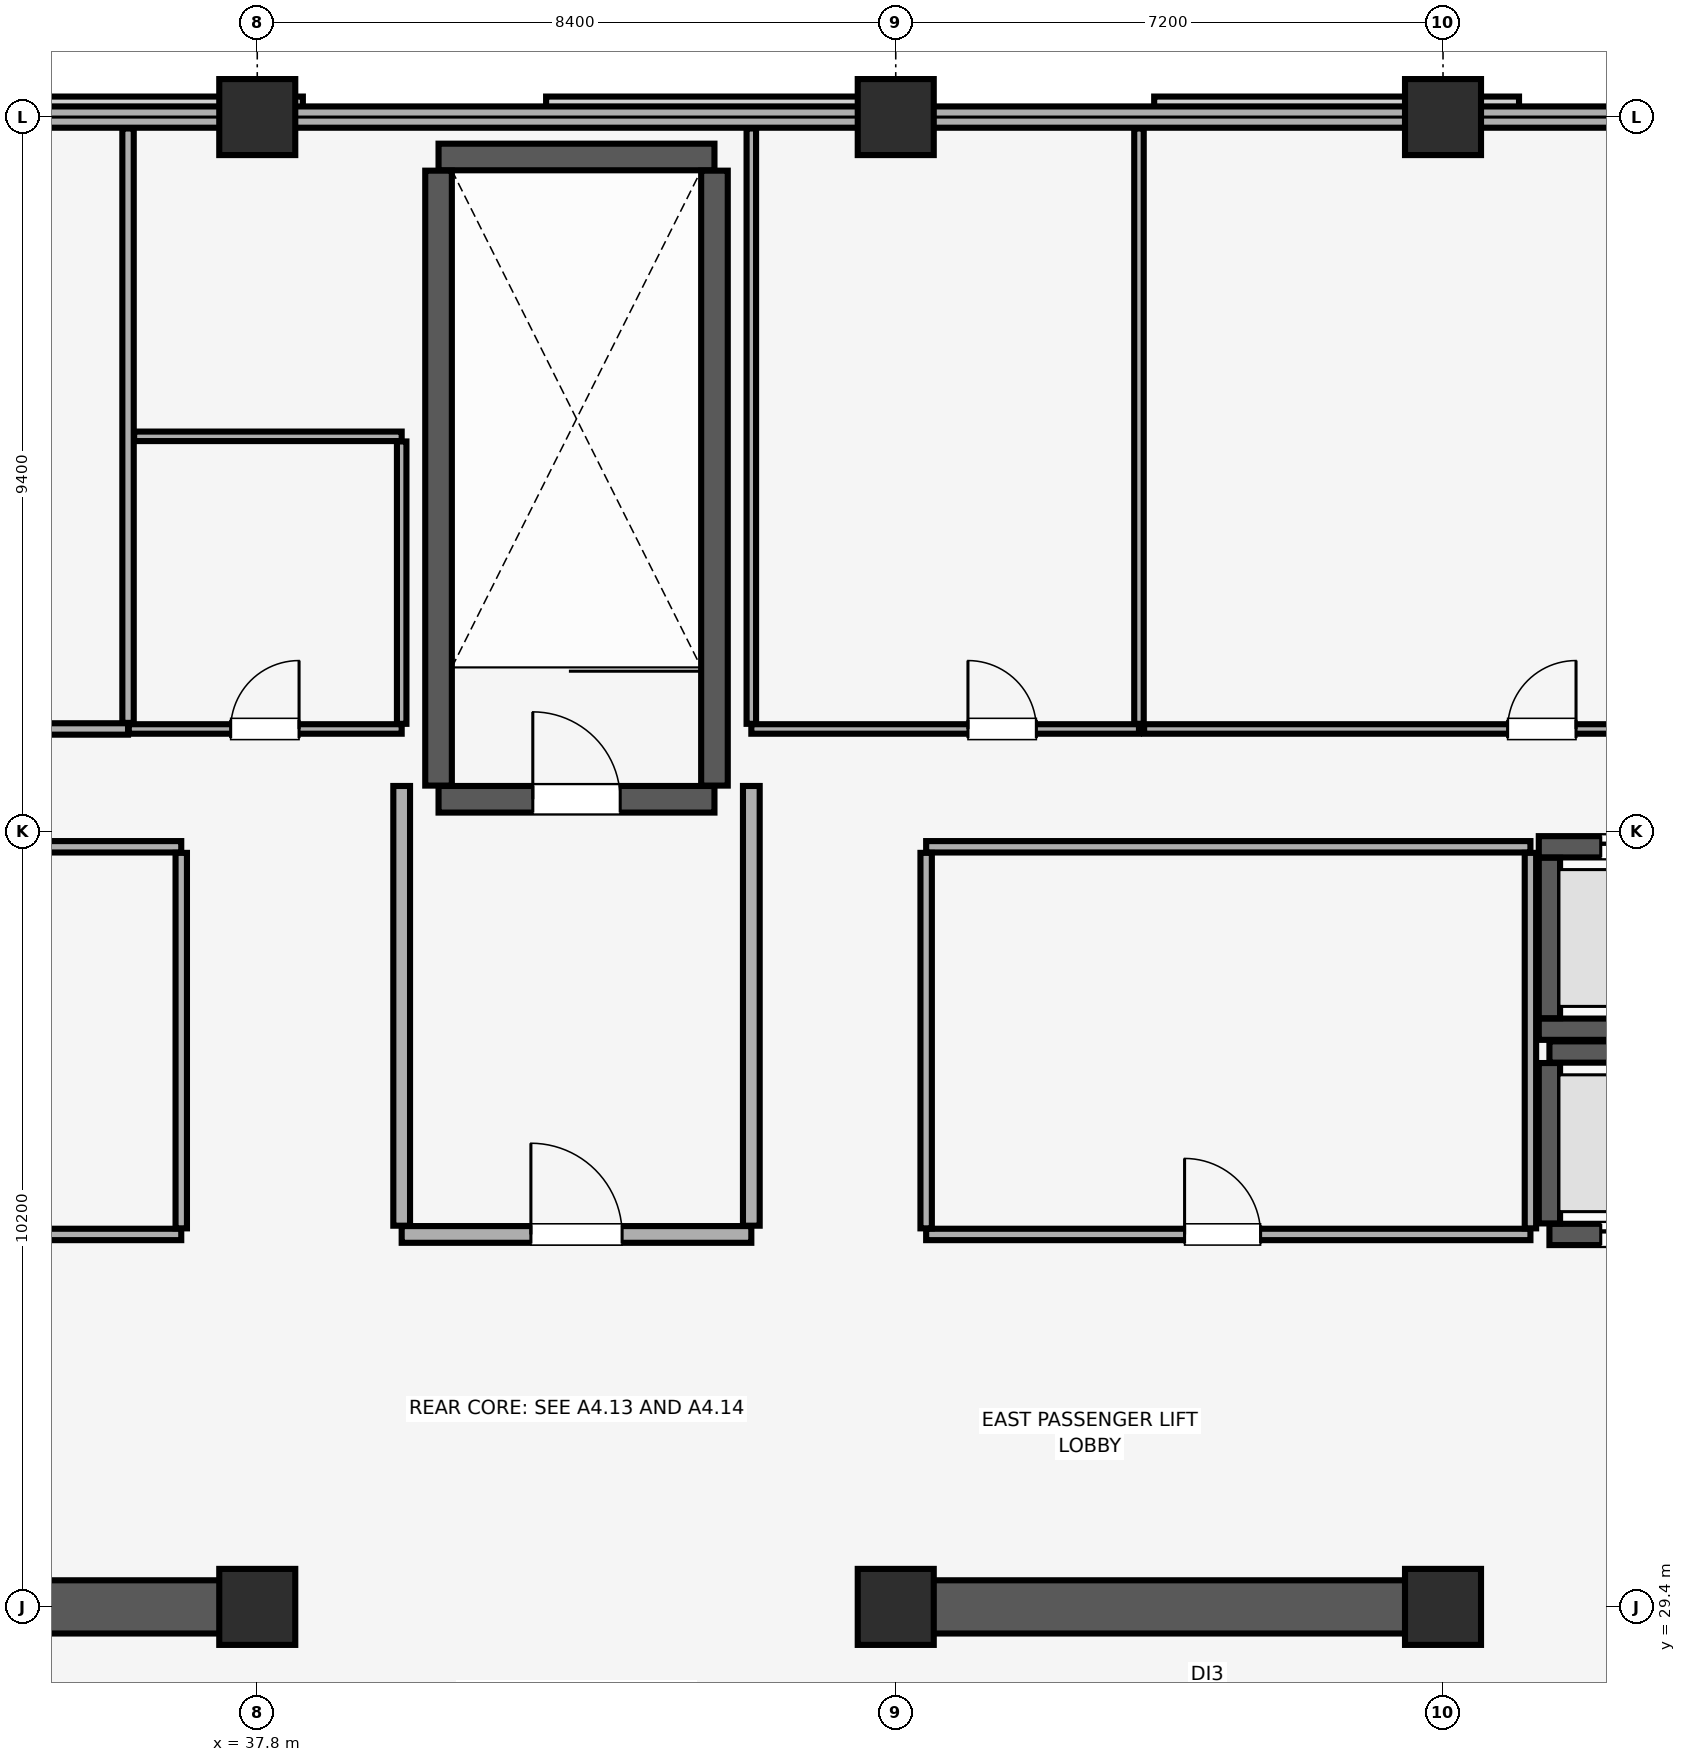
"""IFC4 building model, lengths in metres.
Left out: names, types, materials, properties, quantities, classifications, styles, units other than length and angle.
Written with IfcOpenShell. Run it as: python <this file> out.ifc"""

import sys

from ifc_helpers import new_model, si_unit, direction, frame, frame_2d, origin, origin_2d, place, context, subcontext, project, spatial, rectangle, extrude, element, fill, save


model = new_model("IFC4")
c1 = context("Model", 3, precision=1e-05, world=origin(), true_north=direction((0.0, 1.0)))
c2 = subcontext(c1, "Body", "Model", "MODEL_VIEW")
j1 = project(units=[si_unit("LENGTHUNIT", "METRE"), si_unit("PLANEANGLEUNIT", "RADIAN")], contexts=[c1])
p1 = place(None, origin())
s1 = spatial("IfcSite", under=j1, at=p1, CompositionType="ELEMENT")
p2 = place(p1, origin())
s2 = spatial("IfcBuilding", under=s1, at=p2, CompositionType="ELEMENT")
p3 = place(p2, frame((0.0, 0.0, 310.7)))
s3 = spatial("IfcBuildingStorey", under=s2, at=p3, CompositionType="ELEMENT", Elevation=310.7)
for number, where, z_axis, x_axis in (
    (1, (37.8, 29.4, 0.0), (0.0, 0.0, 1.0), (1.0, 0.0, 0.0)),
    (2, (37.8, 49.0, 0.0), (0.0, 0.0, 1.0), (1.0, 0.0, 0.0)),
    (3, (46.2, 29.4, 0.0), (0.0, 0.0, 1.0), (1.0, 0.0, 0.0)),
    (4, (46.2, 49.0, 0.0), (0.0, 0.0, 1.0), (1.0, 0.0, 0.0)),
    (5, (53.4, 29.4, 0.0), (0.0, 0.0, 1.0), (1.0, 0.0, 0.0)),
    (6, (53.4, 49.0, 0.0), (0.0, 0.0, 1.0), (1.0, 0.0, 0.0)),
):
    element("IfcColumn", number, at=place(p3, frame(where, z_axis=z_axis, x_axis=x_axis)), inside=s3, PredefinedType="COLUMN", context=c2, shape_type="SweptSolid", body=[
        extrude(rectangle(XDim=1.0, YDim=1.0, at=origin_2d()), origin(), (0.0, 0.0, 1.0), 7.5),
    ])
p4 = place(p3, frame((67.0, 49.0, 0.0), z_axis=(0.0, 0.0, 1.0), x_axis=(-1.0, 0.0, 0.0)))
e7 = element("IfcWall", 7, at=p4, inside=s3, PredefinedType="SOLIDWALL", context=c2, shape_type="SweptSolid", body=[
    extrude(rectangle(XDim=50.0, YDim=0.28, at=frame_2d((25.0, 0.0))), origin(), (0.0, 0.0, 1.0), 7.0),
])
for number, where, z_axis, x_axis in (
    (8, (30.4, 29.4, 0.0), (0.0, 0.0, 1.0), (1.0, 0.0, 0.0)),
    (9, (46.0, 29.4, 0.0), (0.0, 0.0, 1.0), (1.0, 0.0, 0.0)),
):
    element("IfcWall", number, at=place(p3, frame(where, z_axis=z_axis, x_axis=x_axis)), inside=s3, PredefinedType="SHEAR", context=c2, shape_type="SweptSolid", body=[
        extrude(rectangle(XDim=7.6, YDim=0.7, at=frame_2d((3.8, 0.0))), origin(), (0.0, 0.0, 1.0), 7.5),
    ])
p5 = place(p3, frame((40.185, 40.025, 0.0), z_axis=(0.0, 0.0, 1.0), x_axis=(1.0, 0.0, 0.0)))
e10 = element("IfcWall", 10, at=p5, inside=s3, PredefinedType="SHEAR", context=c2, shape_type="SweptSolid", body=[
    extrude(rectangle(XDim=3.63, YDim=0.35, at=frame_2d((1.815, 0.0))), origin(), (0.0, 0.0, 1.0), 7.5),
])
p6 = place(p5, frame((1.24, 0.0, 0.0)))
e11 = element("IfcOpeningElement", 11, at=p6, cuts=e10, PredefinedType="OPENING", context=c2, shape_type="SweptSolid", body=[
    extrude(rectangle(XDim=1.15, YDim=2.15, at=frame_2d((0.575, 1.075))), frame((0.0, 0.185, 0.0), z_axis=(0.0, -1.0, 0.0), x_axis=(1.0, 0.0, 0.0)), (0.0, 0.0, 1.0), 0.37),
])
p7 = place(p3, frame((40.185, 48.475, 0.0), z_axis=(0.0, 0.0, 1.0), x_axis=(1.0, 0.0, 0.0)))
e12 = element("IfcWall", 12, at=p7, inside=s3, PredefinedType="SHEAR", context=c2, shape_type="SweptSolid", body=[
    extrude(rectangle(XDim=3.63, YDim=0.35, at=frame_2d((1.815, 0.0))), origin(), (0.0, 0.0, 1.0), 7.5),
])
for number, where, z_axis, x_axis in (
    (13, (40.185, 40.205, 0.0), (0.0, 0.0, 1.0), (0.0, 1.0, 0.0)),
    (14, (43.815, 40.205, 0.0), (0.0, 0.0, 1.0), (0.0, 1.0, 0.0)),
):
    element("IfcWall", number, at=place(p3, frame(where, z_axis=z_axis, x_axis=x_axis)), inside=s3, PredefinedType="SHEAR", context=c2, shape_type="SweptSolid", body=[
        extrude(rectangle(XDim=8.09, YDim=0.35, at=frame_2d((4.045, 0.0))), origin(), (0.0, 0.0, 1.0), 7.5),
    ])
p8 = place(p3, frame((54.8, 34.3, 0.0), z_axis=(0.0, 0.0, 1.0), x_axis=(1.0, 0.0, 0.0)))
e15 = element("IfcWall", 15, at=p8, inside=s3, PredefinedType="SHEAR", context=c2, shape_type="SweptSolid", body=[
    extrude(rectangle(XDim=2.55, YDim=0.28, at=frame_2d((1.275, 0.0))), origin(), (0.0, 0.0, 1.0), 7.5),
])
p9 = place(p8, frame((0.675, 0.0, 0.0)))
e16 = element("IfcOpeningElement", 16, at=p9, cuts=e15, PredefinedType="OPENING", context=c2, shape_type="SweptSolid", body=[
    extrude(rectangle(XDim=1.2, YDim=2.25, at=frame_2d((0.6, 1.125))), frame((0.0, 0.15, 0.0), z_axis=(0.0, -1.0, 0.0), x_axis=(1.0, 0.0, 0.0)), (0.0, 0.0, 1.0), 0.3),
])
p10 = place(p3, frame((54.8, 36.7, 0.0), z_axis=(0.0, 0.0, 1.0), x_axis=(1.0, 0.0, 0.0)))
e17 = element("IfcWall", 17, at=p10, inside=s3, PredefinedType="SHEAR", context=c2, shape_type="SweptSolid", body=[
    extrude(rectangle(XDim=2.55, YDim=0.28, at=frame_2d((1.275, 0.0))), origin(), (0.0, 0.0, 1.0), 7.5),
])
p11 = place(p3, frame((54.8, 34.445, 0.0), z_axis=(0.0, 0.0, 1.0), x_axis=(0.0, 1.0, 0.0)))
e18 = element("IfcWall", 18, at=p11, inside=s3, PredefinedType="SHEAR", context=c2, shape_type="SweptSolid", body=[
    extrude(rectangle(XDim=2.11, YDim=0.28, at=frame_2d((1.055, 0.0))), origin(), (0.0, 0.0, 1.0), 7.5),
])
p12 = place(p3, frame((54.66, 37.0, 0.0), z_axis=(0.0, 0.0, 1.0), x_axis=(1.0, 0.0, 0.0)))
e19 = element("IfcWall", 19, at=p12, inside=s3, PredefinedType="SHEAR", context=c2, shape_type="SweptSolid", body=[
    extrude(rectangle(XDim=2.83, YDim=0.28, at=frame_2d((1.415, 0.0))), origin(), (0.0, 0.0, 1.0), 7.5),
])
p13 = place(p3, frame((54.66, 39.4, 0.0), z_axis=(0.0, 0.0, 1.0), x_axis=(1.0, 0.0, 0.0)))
e20 = element("IfcWall", 20, at=p13, inside=s3, PredefinedType="SHEAR", context=c2, shape_type="SweptSolid", body=[
    extrude(rectangle(XDim=2.83, YDim=0.28, at=frame_2d((1.415, 0.0))), origin(), (0.0, 0.0, 1.0), 7.5),
])
p14 = place(p13, frame((0.815, 0.0, 0.0)))
e21 = element("IfcOpeningElement", 21, at=p14, cuts=e20, PredefinedType="OPENING", context=c2, shape_type="SweptSolid", body=[
    extrude(rectangle(XDim=1.2, YDim=2.25, at=frame_2d((0.6, 1.125))), frame((0.0, 0.15, 0.0), z_axis=(0.0, -1.0, 0.0), x_axis=(1.0, 0.0, 0.0)), (0.0, 0.0, 1.0), 0.3),
])
p15 = place(p3, frame((54.8, 37.145, 0.0), z_axis=(0.0, 0.0, 1.0), x_axis=(0.0, 1.0, 0.0)))
e22 = element("IfcWall", 22, at=p15, inside=s3, PredefinedType="SHEAR", context=c2, shape_type="SweptSolid", body=[
    extrude(rectangle(XDim=2.11, YDim=0.28, at=frame_2d((1.055, 0.0))), origin(), (0.0, 0.0, 1.0), 7.5),
])
p16 = place(p3, frame((39.7, 34.3, 0.0), z_axis=(0.0, 0.0, 1.0), x_axis=(1.0, 0.0, 0.0)))
e23 = element("IfcWall", 23, at=p16, inside=s3, PredefinedType="PARTITIONING", context=c2, shape_type="SweptSolid", body=[
    extrude(rectangle(XDim=4.6, YDim=0.22, at=frame_2d((2.3, 0.0))), origin(), (0.0, 0.0, 1.0), 7.5),
])
p17 = place(p16, frame((1.7, 0.0, 0.0)))
e24 = element("IfcOpeningElement", 24, at=p17, cuts=e23, PredefinedType="OPENING", context=c2, shape_type="SweptSolid", body=[
    extrude(rectangle(XDim=1.2, YDim=2.15, at=frame_2d((0.6, 1.075))), frame((0.0, 0.12, 0.0), z_axis=(0.0, -1.0, 0.0), x_axis=(1.0, 0.0, 0.0)), (0.0, 0.0, 1.0), 0.24),
])
for number, where, z_axis, x_axis in (
    (25, (39.7, 34.415, 0.0), (0.0, 0.0, 1.0), (0.0, 1.0, 0.0)),
    (26, (44.3, 34.415, 0.0), (0.0, 0.0, 1.0), (0.0, 1.0, 0.0)),
):
    element("IfcWall", number, at=place(p3, frame(where, z_axis=z_axis, x_axis=x_axis)), inside=s3, PredefinedType="PARTITIONING", context=c2, shape_type="SweptSolid", body=[
        extrude(rectangle(XDim=5.785, YDim=0.22, at=frame_2d((2.893, 0.0))), origin(), (0.0, 0.0, 1.0), 7.5),
    ])
p18 = place(p3, frame((31.6, 34.3, 0.0), z_axis=(0.0, 0.0, 1.0), x_axis=(1.0, 0.0, 0.0)))
e27 = element("IfcWall", 27, at=p18, inside=s3, PredefinedType="PARTITIONING", context=c2, shape_type="SweptSolid", body=[
    extrude(rectangle(XDim=5.2, YDim=0.15, at=frame_2d((2.6, 0.0))), origin(), (0.0, 0.0, 1.0), 7.5),
])
p19 = place(p18, frame((2.175, 0.0, 0.0)))
e28 = element("IfcOpeningElement", 28, at=p19, cuts=e27, PredefinedType="OPENING", context=c2, shape_type="SweptSolid", body=[
    extrude(rectangle(XDim=0.85, YDim=2.1, at=frame_2d((0.425, 1.05))), frame((0.0, 0.085, 0.0), z_axis=(0.0, -1.0, 0.0), x_axis=(1.0, 0.0, 0.0)), (0.0, 0.0, 1.0), 0.17),
])
p20 = place(p3, frame((31.6, 39.4, 0.0), z_axis=(0.0, 0.0, 1.0), x_axis=(1.0, 0.0, 0.0)))
e29 = element("IfcWall", 29, at=p20, inside=s3, PredefinedType="PARTITIONING", context=c2, shape_type="SweptSolid", body=[
    extrude(rectangle(XDim=5.2, YDim=0.15, at=frame_2d((2.6, 0.0))), origin(), (0.0, 0.0, 1.0), 7.5),
])
p21 = place(p3, frame((36.8, 34.38, 0.0), z_axis=(0.0, 0.0, 1.0), x_axis=(0.0, 1.0, 0.0)))
e30 = element("IfcWall", 30, at=p21, inside=s3, PredefinedType="PARTITIONING", context=c2, shape_type="SweptSolid", body=[
    extrude(rectangle(XDim=4.94, YDim=0.15, at=frame_2d((2.47, 0.0))), origin(), (0.0, 0.0, 1.0), 7.5),
])
p22 = place(p3, frame((46.6, 34.3, 0.0), z_axis=(0.0, 0.0, 1.0), x_axis=(1.0, 0.0, 0.0)))
e31 = element("IfcWall", 31, at=p22, inside=s3, PredefinedType="PARTITIONING", context=c2, shape_type="SweptSolid", body=[
    extrude(rectangle(XDim=7.95, YDim=0.15, at=frame_2d((3.975, 0.0))), origin(), (0.0, 0.0, 1.0), 7.5),
])
p23 = place(p22, frame((3.4, 0.0, 0.0)))
e32 = element("IfcOpeningElement", 32, at=p23, cuts=e31, PredefinedType="OPENING", context=c2, shape_type="SweptSolid", body=[
    extrude(rectangle(XDim=1.0, YDim=2.15, at=frame_2d((0.5, 1.075))), frame((0.0, 0.085, 0.0), z_axis=(0.0, -1.0, 0.0), x_axis=(1.0, 0.0, 0.0)), (0.0, 0.0, 1.0), 0.17),
])
p24 = place(p3, frame((46.6, 39.4, 0.0), z_axis=(0.0, 0.0, 1.0), x_axis=(1.0, 0.0, 0.0)))
e33 = element("IfcWall", 33, at=p24, inside=s3, PredefinedType="PARTITIONING", context=c2, shape_type="SweptSolid", body=[
    extrude(rectangle(XDim=7.95, YDim=0.15, at=frame_2d((3.975, 0.0))), origin(), (0.0, 0.0, 1.0), 7.5),
])
for number, where, z_axis, x_axis in (
    (34, (46.6, 34.38, 0.0), (0.0, 0.0, 1.0), (0.0, 1.0, 0.0)),
    (35, (54.55, 34.38, 0.0), (0.0, 0.0, 1.0), (0.0, 1.0, 0.0)),
):
    element("IfcWall", number, at=place(p3, frame(where, z_axis=z_axis, x_axis=x_axis)), inside=s3, PredefinedType="PARTITIONING", context=c2, shape_type="SweptSolid", body=[
        extrude(rectangle(XDim=4.94, YDim=0.15, at=frame_2d((2.47, 0.0))), origin(), (0.0, 0.0, 1.0), 7.5),
    ])
p25 = place(p3, frame((28.41, 40.95, 0.0), z_axis=(0.0, 0.0, 1.0), x_axis=(1.0, 0.0, 0.0)))
e36 = element("IfcWall", 36, at=p25, inside=s3, PredefinedType="PARTITIONING", context=c2, shape_type="SweptSolid", body=[
    extrude(rectangle(XDim=7.69, YDim=0.15, at=frame_2d((3.845, 0.0))), origin(), (0.0, 0.0, 1.0), 7.5),
])
p26 = place(p25, frame((3.415, 0.0, 0.0)))
e37 = element("IfcOpeningElement", 37, at=p26, cuts=e36, PredefinedType="OPENING", context=c2, shape_type="SweptSolid", body=[
    extrude(rectangle(XDim=0.85, YDim=2.1, at=frame_2d((0.425, 1.05))), frame((0.0, 0.085, 0.0), z_axis=(0.0, -1.0, 0.0), x_axis=(1.0, 0.0, 0.0)), (0.0, 0.0, 1.0), 0.17),
])
p27 = place(p3, frame((36.1, 41.03, 0.0), z_axis=(0.0, 0.0, 1.0), x_axis=(0.0, 1.0, 0.0)))
e38 = element("IfcWall", 38, at=p27, inside=s3, PredefinedType="PARTITIONING", context=c2, shape_type="SweptSolid", body=[
    extrude(rectangle(XDim=7.82, YDim=0.15, at=frame_2d((3.91, 0.0))), origin(), (0.0, 0.0, 1.0), 7.5),
])
p28 = place(p3, frame((36.11, 40.95, 0.0), z_axis=(0.0, 0.0, 1.0), x_axis=(1.0, 0.0, 0.0)))
e39 = element("IfcWall", 39, at=p28, inside=s3, PredefinedType="PARTITIONING", context=c2, shape_type="SweptSolid", body=[
    extrude(rectangle(XDim=3.59, YDim=0.125, at=frame_2d((1.795, 0.0))), origin(), (0.0, 0.0, 1.0), 7.5),
])
p29 = place(p28, frame((1.34, 0.0, 0.0)))
e40 = element("IfcOpeningElement", 40, at=p29, cuts=e39, PredefinedType="OPENING", context=c2, shape_type="SweptSolid", body=[
    extrude(rectangle(XDim=0.9, YDim=2.1, at=frame_2d((0.45, 1.05))), frame((0.0, 0.073, 0.0), z_axis=(0.0, -1.0, 0.0), x_axis=(1.0, 0.0, 0.0)), (0.0, 0.0, 1.0), 0.145),
])
p30 = place(p3, frame((36.18, 44.8, 0.0), z_axis=(0.0, 0.0, 1.0), x_axis=(1.0, 0.0, 0.0)))
e41 = element("IfcWall", 41, at=p30, inside=s3, PredefinedType="PARTITIONING", context=c2, shape_type="SweptSolid", body=[
    extrude(rectangle(XDim=3.52, YDim=0.125, at=frame_2d((1.76, 0.0))), origin(), (0.0, 0.0, 1.0), 7.5),
])
p31 = place(p3, frame((39.7, 41.018, 0.0), z_axis=(0.0, 0.0, 1.0), x_axis=(0.0, 1.0, 0.0)))
e42 = element("IfcWall", 42, at=p31, inside=s3, PredefinedType="PARTITIONING", context=c2, shape_type="SweptSolid", body=[
    extrude(rectangle(XDim=3.715, YDim=0.125, at=frame_2d((1.857, 0.0))), origin(), (0.0, 0.0, 1.0), 7.5),
])
p32 = place(p3, frame((44.3, 40.95, 0.0), z_axis=(0.0, 0.0, 1.0), x_axis=(1.0, 0.0, 0.0)))
e43 = element("IfcWall", 43, at=p32, inside=s3, PredefinedType="PARTITIONING", context=c2, shape_type="SweptSolid", body=[
    extrude(rectangle(XDim=5.1, YDim=0.125, at=frame_2d((2.55, 0.0))), origin(), (0.0, 0.0, 1.0), 7.5),
])
p33 = place(p32, frame((2.85, 0.0, 0.0)))
e44 = element("IfcOpeningElement", 44, at=p33, cuts=e43, PredefinedType="OPENING", context=c2, shape_type="SweptSolid", body=[
    extrude(rectangle(XDim=0.9, YDim=2.1, at=frame_2d((0.45, 1.05))), frame((0.0, 0.073, 0.0), z_axis=(0.0, -1.0, 0.0), x_axis=(1.0, 0.0, 0.0)), (0.0, 0.0, 1.0), 0.145),
])
for number, where, z_axis, x_axis in (
    (45, (44.3, 41.018, 0.0), (0.0, 0.0, 1.0), (0.0, 1.0, 0.0)),
    (46, (49.4, 41.018, 0.0), (0.0, 0.0, 1.0), (0.0, 1.0, 0.0)),
):
    element("IfcWall", number, at=place(p3, frame(where, z_axis=z_axis, x_axis=x_axis)), inside=s3, PredefinedType="PARTITIONING", context=c2, shape_type="SweptSolid", body=[
        extrude(rectangle(XDim=7.833, YDim=0.125, at=frame_2d((3.916, 0.0))), origin(), (0.0, 0.0, 1.0), 7.5),
    ])
p34 = place(p3, frame((49.468, 40.95, 0.0), z_axis=(0.0, 0.0, 1.0), x_axis=(1.0, 0.0, 0.0)))
e47 = element("IfcWall", 47, at=p34, inside=s3, PredefinedType="PARTITIONING", context=c2, shape_type="SweptSolid", body=[
    extrude(rectangle(XDim=8.032, YDim=0.125, at=frame_2d((4.016, 0.0))), origin(), (0.0, 0.0, 1.0), 7.5),
])
p35 = place(p34, frame((4.782, 0.0, 0.0)))
e48 = element("IfcOpeningElement", 48, at=p35, cuts=e47, PredefinedType="OPENING", context=c2, shape_type="SweptSolid", body=[
    extrude(rectangle(XDim=0.9, YDim=2.1, at=frame_2d((0.45, 1.05))), frame((0.0, 0.073, 0.0), z_axis=(0.0, -1.0, 0.0), x_axis=(1.0, 0.0, 0.0)), (0.0, 0.0, 1.0), 0.145),
])
p36 = place(p6, origin())
e49 = element("IfcDoor", 49, at=p36, inside=s3, OperationType="SINGLE_SWING_LEFT", PredefinedType="DOOR", context=c2, shape_type="SweptSolid", body=[
    extrude(rectangle(XDim=1.15, YDim=2.15, at=frame_2d((0.575, 1.075))), frame((0.0, 0.025, 0.0), z_axis=(0.0, -1.0, 0.0), x_axis=(1.0, 0.0, 0.0)), (0.0, 0.0, 1.0), 0.05),
])
fill(e11, e49)
p37 = place(p9, origin())
e50 = element("IfcDoor", 50, at=p37, inside=s3, OperationType="DOUBLE_DOOR_SLIDING", PredefinedType="DOOR", context=c2, shape_type="SweptSolid", body=[
    extrude(rectangle(XDim=1.2, YDim=2.25, at=frame_2d((0.6, 1.125))), frame((0.0, 0.025, 0.0), z_axis=(0.0, -1.0, 0.0), x_axis=(1.0, 0.0, 0.0)), (0.0, 0.0, 1.0), 0.05),
])
fill(e16, e50)
p38 = place(p14, origin())
e51 = element("IfcDoor", 51, at=p38, inside=s3, OperationType="DOUBLE_DOOR_SLIDING", PredefinedType="DOOR", context=c2, shape_type="SweptSolid", body=[
    extrude(rectangle(XDim=1.2, YDim=2.25, at=frame_2d((0.6, 1.125))), frame((0.0, 0.025, 0.0), z_axis=(0.0, -1.0, 0.0), x_axis=(1.0, 0.0, 0.0)), (0.0, 0.0, 1.0), 0.05),
])
fill(e21, e51)
p39 = place(p17, origin())
e52 = element("IfcDoor", 52, at=p39, inside=s3, OperationType="SINGLE_SWING_LEFT", PredefinedType="DOOR", context=c2, shape_type="SweptSolid", body=[
    extrude(rectangle(XDim=1.2, YDim=2.15, at=frame_2d((0.6, 1.075))), frame((0.0, 0.025, 0.0), z_axis=(0.0, -1.0, 0.0), x_axis=(1.0, 0.0, 0.0)), (0.0, 0.0, 1.0), 0.05),
])
fill(e24, e52)
p40 = place(p23, origin())
e53 = element("IfcDoor", 53, at=p40, inside=s3, OperationType="SINGLE_SWING_LEFT", PredefinedType="DOOR", context=c2, shape_type="SweptSolid", body=[
    extrude(rectangle(XDim=1.0, YDim=2.15, at=frame_2d((0.5, 1.075))), frame((0.0, 0.025, 0.0), z_axis=(0.0, -1.0, 0.0), x_axis=(1.0, 0.0, 0.0)), (0.0, 0.0, 1.0), 0.05),
])
fill(e32, e53)
p41 = place(p29, origin())
e54 = element("IfcDoor", 54, at=p41, inside=s3, OperationType="SINGLE_SWING_RIGHT", PredefinedType="DOOR", context=c2, shape_type="SweptSolid", body=[
    extrude(rectangle(XDim=0.9, YDim=2.1, at=frame_2d((0.45, 1.05))), frame((0.0, 0.025, 0.0), z_axis=(0.0, -1.0, 0.0), x_axis=(1.0, 0.0, 0.0)), (0.0, 0.0, 1.0), 0.05),
])
fill(e40, e54)
p42 = place(p33, origin())
e55 = element("IfcDoor", 55, at=p42, inside=s3, OperationType="SINGLE_SWING_LEFT", PredefinedType="DOOR", context=c2, shape_type="SweptSolid", body=[
    extrude(rectangle(XDim=0.9, YDim=2.1, at=frame_2d((0.45, 1.05))), frame((0.0, 0.025, 0.0), z_axis=(0.0, -1.0, 0.0), x_axis=(1.0, 0.0, 0.0)), (0.0, 0.0, 1.0), 0.05),
])
fill(e44, e55)
p43 = place(p35, origin())
e56 = element("IfcDoor", 56, at=p43, inside=s3, OperationType="SINGLE_SWING_RIGHT", PredefinedType="DOOR", context=c2, shape_type="SweptSolid", body=[
    extrude(rectangle(XDim=0.9, YDim=2.1, at=frame_2d((0.45, 1.05))), frame((0.0, 0.025, 0.0), z_axis=(0.0, -1.0, 0.0), x_axis=(1.0, 0.0, 0.0)), (0.0, 0.0, 1.0), 0.05),
])
fill(e48, e56)
save(model, sys.argv[1])
